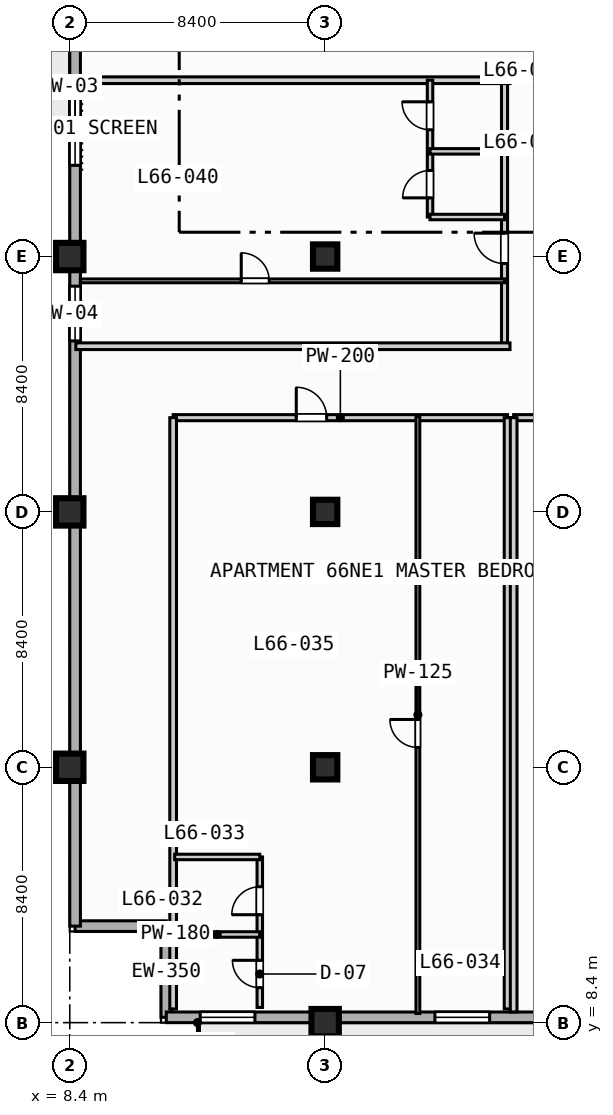
"""IFC4 building model, lengths in metres.
Left out: names, types, materials, properties, quantities, classifications, styles, units other than length and angle.
Written with IfcOpenShell. Run it as: python <this file> out.ifc"""

import sys

from ifc_helpers import new_model, si_unit, direction, frame, frame_2d, origin, origin_2d, place, context, subcontext, project, spatial, rectangle, extrude, element, fill, save


model = new_model("IFC4")
c1 = context("Model", 3, precision=1e-05, world=origin(), true_north=direction((0.0, 1.0)))
c2 = subcontext(c1, "Body", "Model", "MODEL_VIEW")
j1 = project(units=[si_unit("LENGTHUNIT", "METRE"), si_unit("PLANEANGLEUNIT", "RADIAN")], contexts=[c1])
p1 = place(None, origin())
s1 = spatial("IfcSite", under=j1, at=p1, CompositionType="ELEMENT")
p2 = place(p1, origin())
s2 = spatial("IfcBuilding", under=s1, at=p2, CompositionType="ELEMENT")
p3 = place(p2, frame((0.0, 0.0, 267.5)))
s3 = spatial("IfcBuildingStorey", under=s2, at=p3, CompositionType="ELEMENT", Elevation=267.5)
for number, where, z_axis, x_axis in (
    (1, (8.4, 16.8, 0.0), (0.0, 0.0, 1.0), (1.0, 0.0, 0.0)),
    (2, (8.4, 25.2, 0.0), (0.0, 0.0, 1.0), (1.0, 0.0, 0.0)),
    (3, (8.4, 33.6, 0.0), (0.0, 0.0, 1.0), (1.0, 0.0, 0.0)),
    (4, (16.8, 8.4, 0.0), (0.0, 0.0, 1.0), (1.0, 0.0, 0.0)),
):
    element("IfcColumn", number, at=place(p3, frame(where, z_axis=z_axis, x_axis=x_axis)), inside=s3, PredefinedType="COLUMN", context=c2, shape_type="SweptSolid", body=[
        extrude(rectangle(XDim=0.9, YDim=0.9, at=origin_2d()), origin(), (0.0, 0.0, 1.0), 3.7),
    ])
for number, where, z_axis, x_axis in (
    (5, (16.8, 16.8, 0.0), (0.0, 0.0, 1.0), (1.0, 0.0, 0.0)),
    (6, (16.8, 25.2, 0.0), (0.0, 0.0, 1.0), (1.0, 0.0, 0.0)),
    (7, (16.8, 33.6, 0.0), (0.0, 0.0, 1.0), (1.0, 0.0, 0.0)),
):
    element("IfcColumn", number, at=place(p3, frame(where, z_axis=z_axis, x_axis=x_axis)), inside=s3, PredefinedType="COLUMN", context=c2, shape_type="SweptSolid", body=[
        extrude(rectangle(XDim=0.8, YDim=0.8, at=origin_2d()), origin(), (0.0, 0.0, 1.0), 3.7),
    ])
for number, where, z_axis, x_axis in (
    (8, (11.575, 8.575, 0.0), (0.0, 0.0, 1.0), (0.0, 1.0, 0.0)),
    (9, (11.575, 11.575, 0.0), (0.0, 0.0, 1.0), (-1.0, 0.0, 0.0)),
):
    element("IfcWall", number, at=place(p3, frame(where, z_axis=z_axis, x_axis=x_axis)), inside=s3, PredefinedType="STANDARD", context=c2, shape_type="SweptSolid", body=[
        extrude(rectangle(XDim=3.0, YDim=0.35, at=frame_2d((1.5, 0.0))), origin(), (0.0, 0.0, 1.0), 3.47),
    ])
p4 = place(p3, frame((8.575, 11.575, 0.0), z_axis=(0.0, 0.0, 1.0), x_axis=(0.0, 1.0, 0.0)))
e10 = element("IfcWall", 10, at=p4, inside=s3, PredefinedType="STANDARD", context=c2, shape_type="SweptSolid", body=[
    extrude(rectangle(XDim=60.85, YDim=0.35, at=frame_2d((30.425, 0.0))), origin(), (0.0, 0.0, 1.0), 3.47),
])
p5 = place(p4, frame((33.925, 0.0, 0.0)))
e11 = element("IfcOpeningElement", 11, at=p5, cuts=e10, PredefinedType="OPENING", context=c2, shape_type="SweptSolid", body=[
    extrude(rectangle(XDim=1.4, YDim=2.2, at=frame_2d((0.7, 1.1))), frame((0.0, 0.185, 0.0), z_axis=(0.0, -1.0, 0.0), x_axis=(1.0, 0.0, 0.0)), (0.0, 0.0, 1.0), 0.37),
])
p6 = place(p4, frame((25.025, 0.0, 0.85)))
e12 = element("IfcOpeningElement", 12, at=p6, cuts=e10, PredefinedType="OPENING", context=c2, shape_type="SweptSolid", body=[
    extrude(rectangle(XDim=2.4, YDim=1.95, at=frame_2d((1.2, 0.975))), frame((0.0, 0.185, 0.0), z_axis=(0.0, -1.0, 0.0), x_axis=(1.0, 0.0, 0.0)), (0.0, 0.0, 1.0), 0.37),
])
p7 = place(p4, frame((41.825, 0.0, 0.85)))
e13 = element("IfcOpeningElement", 13, at=p7, cuts=e10, PredefinedType="OPENING", context=c2, shape_type="SweptSolid", body=[
    extrude(rectangle(XDim=2.4, YDim=1.95, at=frame_2d((1.2, 0.975))), frame((0.0, 0.185, 0.0), z_axis=(0.0, -1.0, 0.0), x_axis=(1.0, 0.0, 0.0)), (0.0, 0.0, 1.0), 0.37),
])
p8 = place(p4, frame((19.25, 0.0, 0.85)))
e14 = element("IfcOpeningElement", 14, at=p8, cuts=e10, PredefinedType="OPENING", context=c2, shape_type="SweptSolid", body=[
    extrude(rectangle(XDim=1.8, YDim=1.8, at=frame_2d((0.9, 0.9))), frame((0.0, 0.185, 0.0), z_axis=(0.0, -1.0, 0.0), x_axis=(1.0, 0.0, 0.0)), (0.0, 0.0, 1.0), 0.37),
])
p9 = place(p3, frame((72.425, 8.575, 0.0), z_axis=(0.0, 0.0, 1.0), x_axis=(-1.0, 0.0, 0.0)))
e15 = element("IfcWall", 15, at=p9, inside=s3, PredefinedType="STANDARD", context=c2, shape_type="SweptSolid", body=[
    extrude(rectangle(XDim=60.85, YDim=0.35, at=frame_2d((30.425, 0.0))), origin(), (0.0, 0.0, 1.0), 3.47),
])
p10 = place(p9, frame((42.325, 0.0, 0.0)))
e16 = element("IfcOpeningElement", 16, at=p10, cuts=e15, PredefinedType="OPENING", context=c2, shape_type="SweptSolid", body=[
    extrude(rectangle(XDim=1.4, YDim=2.2, at=frame_2d((0.7, 1.1))), frame((0.0, 0.185, 0.0), z_axis=(0.0, -1.0, 0.0), x_axis=(1.0, 0.0, 0.0)), (0.0, 0.0, 1.0), 0.37),
])
p11 = place(p9, frame((33.425, 0.0, 0.85)))
e17 = element("IfcOpeningElement", 17, at=p11, cuts=e15, PredefinedType="OPENING", context=c2, shape_type="SweptSolid", body=[
    extrude(rectangle(XDim=2.4, YDim=1.95, at=frame_2d((1.2, 0.975))), frame((0.0, 0.185, 0.0), z_axis=(0.0, -1.0, 0.0), x_axis=(1.0, 0.0, 0.0)), (0.0, 0.0, 1.0), 0.37),
])
p12 = place(p9, frame((25.325, 0.0, 0.85)))
e18 = element("IfcOpeningElement", 18, at=p12, cuts=e15, PredefinedType="OPENING", context=c2, shape_type="SweptSolid", body=[
    extrude(rectangle(XDim=1.8, YDim=1.8, at=frame_2d((0.9, 0.9))), frame((0.0, 0.185, 0.0), z_axis=(0.0, -1.0, 0.0), x_axis=(1.0, 0.0, 0.0)), (0.0, 0.0, 1.0), 0.37),
])
p13 = place(p9, frame((50.215, 0.0, 0.85)))
e19 = element("IfcOpeningElement", 19, at=p13, cuts=e15, PredefinedType="OPENING", context=c2, shape_type="SweptSolid", body=[
    extrude(rectangle(XDim=1.8, YDim=1.8, at=frame_2d((0.9, 0.9))), frame((0.0, 0.185, 0.0), z_axis=(0.0, -1.0, 0.0), x_axis=(1.0, 0.0, 0.0)), (0.0, 0.0, 1.0), 0.37),
])
p14 = place(p9, frame((57.935, 0.0, 0.85)))
e20 = element("IfcOpeningElement", 20, at=p14, cuts=e15, PredefinedType="OPENING", context=c2, shape_type="SweptSolid", body=[
    extrude(rectangle(XDim=1.8, YDim=1.8, at=frame_2d((0.9, 0.9))), frame((0.0, 0.185, 0.0), z_axis=(0.0, -1.0, 0.0), x_axis=(1.0, 0.0, 0.0)), (0.0, 0.0, 1.0), 0.37),
])
p15 = place(p3, frame((11.8, 28.3, 0.0), z_axis=(0.0, 0.0, 1.0), x_axis=(1.0, 0.0, 0.0)))
e21 = element("IfcWall", 21, at=p15, inside=s3, PredefinedType="PARTITIONING", context=c2, shape_type="SweptSolid", body=[
    extrude(rectangle(XDim=11.0, YDim=0.2, at=frame_2d((5.5, 0.0))), origin(), (0.0, 0.0, 1.0), 3.47),
])
p16 = place(p15, frame((4.05, 0.0, 0.0)))
e22 = element("IfcOpeningElement", 22, at=p16, cuts=e21, PredefinedType="OPENING", context=c2, shape_type="SweptSolid", body=[
    extrude(rectangle(XDim=1.0, YDim=2.15, at=frame_2d((0.5, 1.075))), frame((0.0, 0.11, 0.0), z_axis=(0.0, -1.0, 0.0), x_axis=(1.0, 0.0, 0.0)), (0.0, 0.0, 1.0), 0.22),
])
for number, where, z_axis, x_axis in (
    (23, (22.8, 8.85, 0.0), (0.0, 0.0, 1.0), (0.0, 1.0, 0.0)),
    (24, (11.8, 8.85, 0.0), (0.0, 0.0, 1.0), (0.0, 1.0, 0.0)),
):
    element("IfcWall", number, at=place(p3, frame(where, z_axis=z_axis, x_axis=x_axis)), inside=s3, PredefinedType="PARTITIONING", context=c2, shape_type="SweptSolid", body=[
        extrude(rectangle(XDim=19.45, YDim=0.22, at=frame_2d((9.725, 0.0))), origin(), (0.0, 0.0, 1.0), 3.47),
    ])
p17 = place(p3, frame((14.65, 8.9, 0.0), z_axis=(0.0, 0.0, 1.0), x_axis=(0.0, 1.0, 0.0)))
e25 = element("IfcWall", 25, at=p17, inside=s3, PredefinedType="PLUMBINGWALL", context=c2, shape_type="SweptSolid", body=[
    extrude(rectangle(XDim=4.95, YDim=0.18, at=frame_2d((2.475, 0.0))), origin(), (0.0, 0.0, 1.0), 3.47),
])
p18 = place(p17, frame((0.65, 0.0, 0.0)))
e26 = element("IfcOpeningElement", 26, at=p18, cuts=e25, PredefinedType="OPENING", context=c2, shape_type="SweptSolid", body=[
    extrude(rectangle(XDim=0.9, YDim=2.1, at=frame_2d((0.45, 1.05))), frame((0.0, 0.1, 0.0), z_axis=(0.0, -1.0, 0.0), x_axis=(1.0, 0.0, 0.0)), (0.0, 0.0, 1.0), 0.2),
])
p19 = place(p17, frame((3.05, 0.0, 0.0)))
e27 = element("IfcOpeningElement", 27, at=p19, cuts=e25, PredefinedType="OPENING", context=c2, shape_type="SweptSolid", body=[
    extrude(rectangle(XDim=0.92, YDim=2.1, at=frame_2d((0.46, 1.05))), frame((0.0, 0.1, 0.0), z_axis=(0.0, -1.0, 0.0), x_axis=(1.0, 0.0, 0.0)), (0.0, 0.0, 1.0), 0.2),
])
for number, where, z_axis, x_axis in (
    (28, (11.85, 11.3, 0.0), (0.0, 0.0, 1.0), (1.0, 0.0, 0.0)),
    (29, (11.85, 13.85, 0.0), (0.0, 0.0, 1.0), (1.0, 0.0, 0.0)),
):
    element("IfcWall", number, at=place(p3, frame(where, z_axis=z_axis, x_axis=x_axis)), inside=s3, PredefinedType="PLUMBINGWALL", context=c2, shape_type="SweptSolid", body=[
        extrude(rectangle(XDim=2.8, YDim=0.18, at=frame_2d((1.4, 0.0))), origin(), (0.0, 0.0, 1.0), 3.47),
    ])
p20 = place(p3, frame((19.85, 8.7, 0.0), z_axis=(0.0, 0.0, 1.0), x_axis=(0.0, 1.0, 0.0)))
e30 = element("IfcWall", 30, at=p20, inside=s3, PredefinedType="PARTITIONING", context=c2, shape_type="SweptSolid", body=[
    extrude(rectangle(XDim=19.65, YDim=0.125, at=frame_2d((9.825, 0.0))), origin(), (0.0, 0.0, 1.0), 3.47),
])
p21 = place(p20, frame((8.752, 0.0, 0.0)))
e31 = element("IfcOpeningElement", 31, at=p21, cuts=e30, PredefinedType="OPENING", context=c2, shape_type="SweptSolid", body=[
    extrude(rectangle(XDim=0.92, YDim=2.1, at=frame_2d((0.46, 1.05))), frame((0.0, 0.073, 0.0), z_axis=(0.0, -1.0, 0.0), x_axis=(1.0, 0.0, 0.0)), (0.0, 0.0, 1.0), 0.145),
])
p22 = place(p3, frame((23.0, 28.3, 0.0), z_axis=(0.0, 0.0, 1.0), x_axis=(1.0, 0.0, 0.0)))
e32 = element("IfcWall", 32, at=p22, inside=s3, PredefinedType="PARTITIONING", context=c2, shape_type="SweptSolid", body=[
    extrude(rectangle(XDim=16.2, YDim=0.2, at=frame_2d((8.1, 0.0))), origin(), (0.0, 0.0, 1.0), 3.47),
])
p23 = place(p22, frame((5.5, 0.0, 0.0)))
e33 = element("IfcOpeningElement", 33, at=p23, cuts=e32, PredefinedType="OPENING", context=c2, shape_type="SweptSolid", body=[
    extrude(rectangle(XDim=2.0, YDim=2.15, at=frame_2d((1.0, 1.075))), frame((0.0, 0.11, 0.0), z_axis=(0.0, -1.0, 0.0), x_axis=(1.0, 0.0, 0.0)), (0.0, 0.0, 1.0), 0.22),
])
p24 = place(p3, frame((23.0, 8.75, 0.0), z_axis=(0.0, 0.0, 1.0), x_axis=(0.0, 1.0, 0.0)))
e34 = element("IfcWall", 34, at=p24, inside=s3, PredefinedType="PARTITIONING", context=c2, shape_type="SweptSolid", body=[
    extrude(rectangle(XDim=19.55, YDim=0.22, at=frame_2d((9.775, 0.0))), origin(), (0.0, 0.0, 1.0), 3.47),
])
p25 = place(p3, frame((22.7, 30.65, 0.0), z_axis=(0.0, 0.0, 1.0), x_axis=(0.0, 1.0, 0.0)))
e35 = element("IfcWall", 35, at=p25, inside=s3, PredefinedType="PARTITIONING", context=c2, shape_type="SweptSolid", body=[
    extrude(rectangle(XDim=8.75, YDim=0.2, at=frame_2d((4.375, 0.0))), origin(), (0.0, 0.0, 1.0), 3.47),
])
p26 = place(p25, frame((2.72, 0.0, 0.0)))
e36 = element("IfcOpeningElement", 36, at=p26, cuts=e35, PredefinedType="OPENING", context=c2, shape_type="SweptSolid", body=[
    extrude(rectangle(XDim=1.0, YDim=2.15, at=frame_2d((0.5, 1.075))), frame((0.0, 0.11, 0.0), z_axis=(0.0, -1.0, 0.0), x_axis=(1.0, 0.0, 0.0)), (0.0, 0.0, 1.0), 0.22),
])
for number, where, z_axis, x_axis in (
    (37, (8.6, 30.65, 0.0), (0.0, 0.0, 1.0), (1.0, 0.0, 0.0)),
    (38, (8.6, 39.4, 0.0), (0.0, 0.0, 1.0), (1.0, 0.0, 0.0)),
):
    element("IfcWall", number, at=place(p3, frame(where, z_axis=z_axis, x_axis=x_axis)), inside=s3, PredefinedType="PARTITIONING", context=c2, shape_type="SweptSolid", body=[
        extrude(rectangle(XDim=14.28, YDim=0.22, at=frame_2d((7.14, 0.0))), origin(), (0.0, 0.0, 1.0), 3.47),
    ])
p27 = place(p3, frame((20.25, 34.9, 0.0), z_axis=(0.0, 0.0, 1.0), x_axis=(0.0, 1.0, 0.0)))
e39 = element("IfcWall", 39, at=p27, inside=s3, PredefinedType="PLUMBINGWALL", context=c2, shape_type="SweptSolid", body=[
    extrude(rectangle(XDim=4.5, YDim=0.18, at=frame_2d((2.25, 0.0))), origin(), (0.0, 0.0, 1.0), 3.47),
])
p28 = place(p27, frame((0.63, 0.0, 0.0)))
e40 = element("IfcOpeningElement", 40, at=p28, cuts=e39, PredefinedType="OPENING", context=c2, shape_type="SweptSolid", body=[
    extrude(rectangle(XDim=0.9, YDim=2.1, at=frame_2d((0.45, 1.05))), frame((0.0, 0.1, 0.0), z_axis=(0.0, -1.0, 0.0), x_axis=(1.0, 0.0, 0.0)), (0.0, 0.0, 1.0), 0.2),
])
p29 = place(p27, frame((2.87, 0.0, 0.0)))
e41 = element("IfcOpeningElement", 41, at=p29, cuts=e39, PredefinedType="OPENING", context=c2, shape_type="SweptSolid", body=[
    extrude(rectangle(XDim=0.92, YDim=2.1, at=frame_2d((0.46, 1.05))), frame((0.0, 0.1, 0.0), z_axis=(0.0, -1.0, 0.0), x_axis=(1.0, 0.0, 0.0)), (0.0, 0.0, 1.0), 0.2),
])
for number, where, z_axis, x_axis in (
    (42, (20.25, 34.9, 0.0), (0.0, 0.0, 1.0), (1.0, 0.0, 0.0)),
    (43, (20.25, 37.06, 0.0), (0.0, 0.0, 1.0), (1.0, 0.0, 0.0)),
):
    element("IfcWall", number, at=place(p3, frame(where, z_axis=z_axis, x_axis=x_axis)), inside=s3, PredefinedType="PLUMBINGWALL", context=c2, shape_type="SweptSolid", body=[
        extrude(rectangle(XDim=2.45, YDim=0.18, at=frame_2d((1.225, 0.0))), origin(), (0.0, 0.0, 1.0), 3.47),
    ])
p30 = place(p3, frame((8.75, 32.8, 0.0), z_axis=(0.0, 0.0, 1.0), x_axis=(1.0, 0.0, 0.0)))
e44 = element("IfcWall", 44, at=p30, inside=s3, PredefinedType="PARTITIONING", context=c2, shape_type="SweptSolid", body=[
    extrude(rectangle(XDim=13.95, YDim=0.125, at=frame_2d((6.975, 0.0))), origin(), (0.0, 0.0, 1.0), 3.47),
])
p31 = place(p30, frame((5.29, 0.0, 0.0)))
e45 = element("IfcOpeningElement", 45, at=p31, cuts=e44, PredefinedType="OPENING", context=c2, shape_type="SweptSolid", body=[
    extrude(rectangle(XDim=0.92, YDim=2.1, at=frame_2d((0.46, 1.05))), frame((0.0, 0.073, 0.0), z_axis=(0.0, -1.0, 0.0), x_axis=(1.0, 0.0, 0.0)), (0.0, 0.0, 1.0), 0.145),
])
p32 = place(p6, origin())
e46 = element("IfcWindow", 46, at=p32, inside=s3, PartitioningType="SINGLE_PANEL", PredefinedType="WINDOW", context=c2, shape_type="SweptSolid", body=[
    extrude(rectangle(XDim=2.4, YDim=1.95, at=frame_2d((1.2, 0.975))), frame((0.0, 0.03, 0.0), z_axis=(0.0, -1.0, 0.0), x_axis=(1.0, 0.0, 0.0)), (0.0, 0.0, 1.0), 0.06),
])
fill(e12, e46)
p33 = place(p8, origin())
e47 = element("IfcWindow", 47, at=p33, inside=s3, PartitioningType="SINGLE_PANEL", PredefinedType="WINDOW", context=c2, shape_type="SweptSolid", body=[
    extrude(rectangle(XDim=1.8, YDim=1.8, at=frame_2d((0.9, 0.9))), frame((0.0, 0.03, 0.0), z_axis=(0.0, -1.0, 0.0), x_axis=(1.0, 0.0, 0.0)), (0.0, 0.0, 1.0), 0.06),
])
fill(e14, e47)
p34 = place(p13, origin())
e48 = element("IfcWindow", 48, at=p34, inside=s3, PartitioningType="SINGLE_PANEL", PredefinedType="WINDOW", context=c2, shape_type="SweptSolid", body=[
    extrude(rectangle(XDim=1.8, YDim=1.8, at=frame_2d((0.9, 0.9))), frame((0.0, 0.03, 0.0), z_axis=(0.0, -1.0, 0.0), x_axis=(1.0, 0.0, 0.0)), (0.0, 0.0, 1.0), 0.06),
])
fill(e19, e48)
p35 = place(p14, origin())
e49 = element("IfcWindow", 49, at=p35, inside=s3, PartitioningType="SINGLE_PANEL", PredefinedType="WINDOW", context=c2, shape_type="SweptSolid", body=[
    extrude(rectangle(XDim=1.8, YDim=1.8, at=frame_2d((0.9, 0.9))), frame((0.0, 0.03, 0.0), z_axis=(0.0, -1.0, 0.0), x_axis=(1.0, 0.0, 0.0)), (0.0, 0.0, 1.0), 0.06),
])
fill(e20, e49)
p36 = place(p16, origin())
e50 = element("IfcDoor", 50, at=p36, inside=s3, OperationType="SINGLE_SWING_LEFT", PredefinedType="DOOR", context=c2, shape_type="SweptSolid", body=[
    extrude(rectangle(XDim=1.0, YDim=2.15, at=frame_2d((0.5, 1.075))), frame((0.0, 0.025, 0.0), z_axis=(0.0, -1.0, 0.0), x_axis=(1.0, 0.0, 0.0)), (0.0, 0.0, 1.0), 0.05),
])
fill(e22, e50)
p37 = place(p18, origin())
e51 = element("IfcDoor", 51, at=p37, inside=s3, OperationType="SINGLE_SWING_RIGHT", PredefinedType="DOOR", context=c2, shape_type="SweptSolid", body=[
    extrude(rectangle(XDim=0.9, YDim=2.1, at=frame_2d((0.45, 1.05))), frame((0.0, 0.025, 0.0), z_axis=(0.0, -1.0, 0.0), x_axis=(1.0, 0.0, 0.0)), (0.0, 0.0, 1.0), 0.05),
])
fill(e26, e51)
p38 = place(p19, origin())
e52 = element("IfcDoor", 52, at=p38, inside=s3, OperationType="SINGLE_SWING_LEFT", PredefinedType="DOOR", context=c2, shape_type="SweptSolid", body=[
    extrude(rectangle(XDim=0.92, YDim=2.1, at=frame_2d((0.46, 1.05))), frame((0.0, 0.025, 0.0), z_axis=(0.0, -1.0, 0.0), x_axis=(1.0, 0.0, 0.0)), (0.0, 0.0, 1.0), 0.05),
])
fill(e27, e52)
p39 = place(p21, origin())
e53 = element("IfcDoor", 53, at=p39, inside=s3, OperationType="SINGLE_SWING_RIGHT", PredefinedType="DOOR", context=c2, shape_type="SweptSolid", body=[
    extrude(rectangle(XDim=0.92, YDim=2.1, at=frame_2d((0.46, 1.05))), frame((0.0, 0.025, 0.0), z_axis=(0.0, -1.0, 0.0), x_axis=(1.0, 0.0, 0.0)), (0.0, 0.0, 1.0), 0.05),
])
fill(e31, e53)
p40 = place(p26, origin())
e54 = element("IfcDoor", 54, at=p40, inside=s3, OperationType="SINGLE_SWING_RIGHT", PredefinedType="DOOR", context=c2, shape_type="SweptSolid", body=[
    extrude(rectangle(XDim=1.0, YDim=2.15, at=frame_2d((0.5, 1.075))), frame((0.0, 0.025, 0.0), z_axis=(0.0, -1.0, 0.0), x_axis=(1.0, 0.0, 0.0)), (0.0, 0.0, 1.0), 0.05),
])
fill(e36, e54)
p41 = place(p28, origin())
e55 = element("IfcDoor", 55, at=p41, inside=s3, OperationType="SINGLE_SWING_LEFT", PredefinedType="DOOR", context=c2, shape_type="SweptSolid", body=[
    extrude(rectangle(XDim=0.9, YDim=2.1, at=frame_2d((0.45, 1.05))), frame((0.0, 0.025, 0.0), z_axis=(0.0, -1.0, 0.0), x_axis=(1.0, 0.0, 0.0)), (0.0, 0.0, 1.0), 0.05),
])
fill(e40, e55)
p42 = place(p29, origin())
e56 = element("IfcDoor", 56, at=p42, inside=s3, OperationType="SINGLE_SWING_RIGHT", PredefinedType="DOOR", context=c2, shape_type="SweptSolid", body=[
    extrude(rectangle(XDim=0.92, YDim=2.1, at=frame_2d((0.46, 1.05))), frame((0.0, 0.025, 0.0), z_axis=(0.0, -1.0, 0.0), x_axis=(1.0, 0.0, 0.0)), (0.0, 0.0, 1.0), 0.05),
])
fill(e41, e56)
p43 = place(p31, origin())
e57 = element("IfcDoor", 57, at=p43, inside=s3, OperationType="SINGLE_SWING_LEFT", PredefinedType="DOOR", context=c2, shape_type="SweptSolid", body=[
    extrude(rectangle(XDim=0.92, YDim=2.1, at=frame_2d((0.46, 1.05))), frame((0.0, 0.025, 0.0), z_axis=(0.0, -1.0, 0.0), x_axis=(1.0, 0.0, 0.0)), (0.0, 0.0, 1.0), 0.05),
])
fill(e45, e57)
save(model, sys.argv[1])
